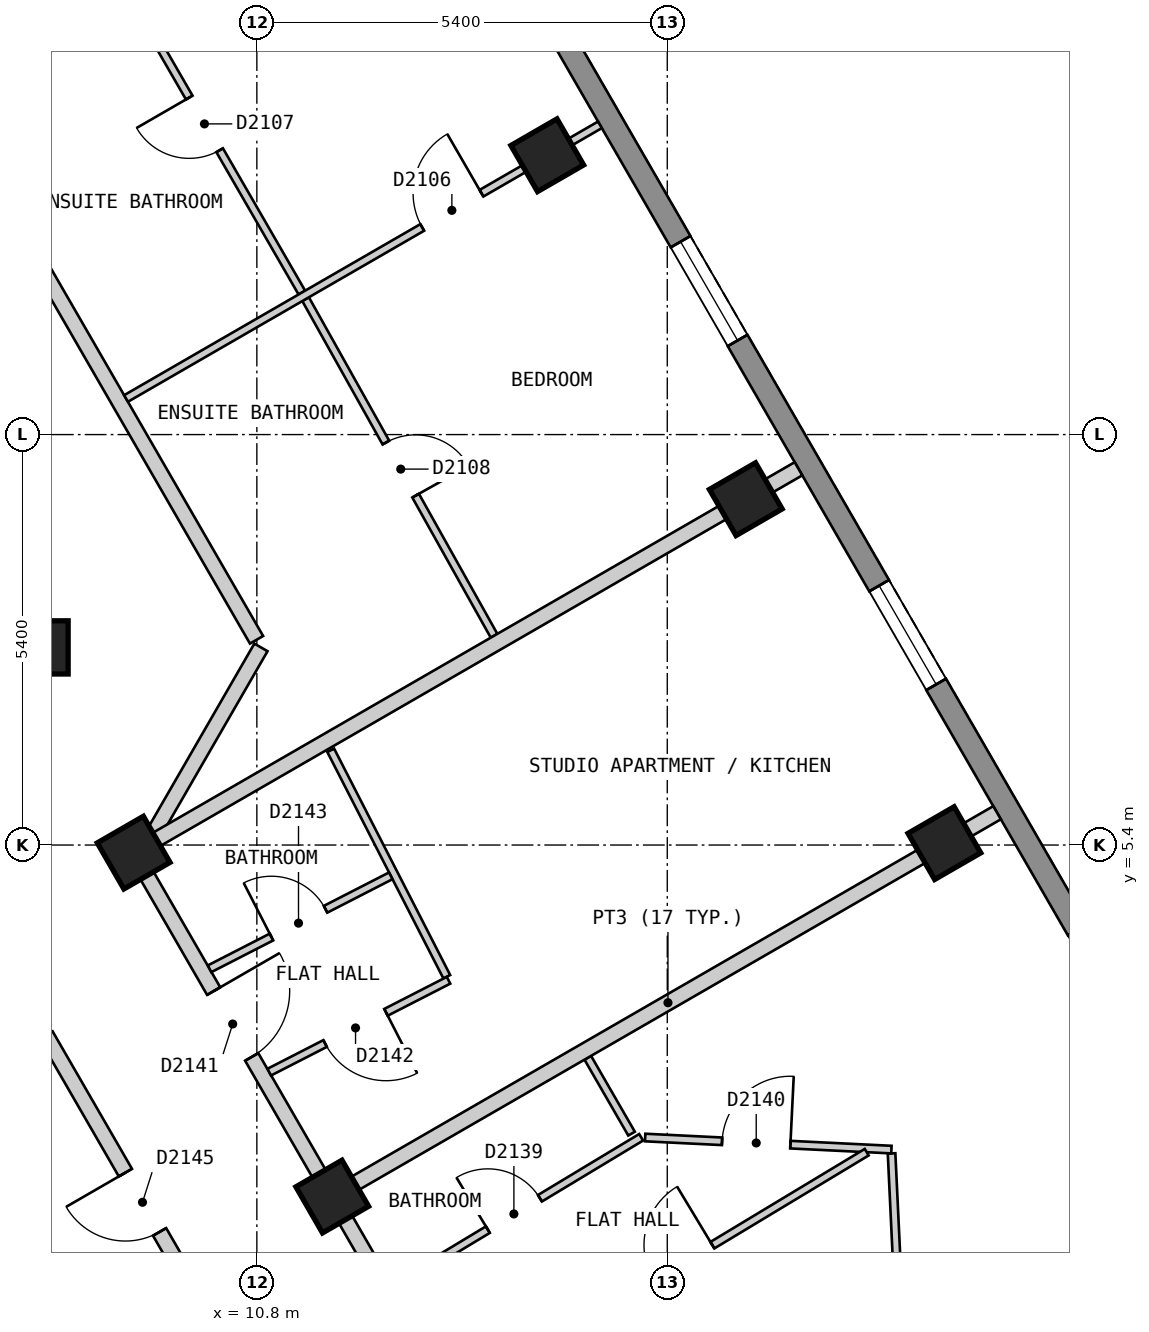
"""IFC4 building model, lengths in metres.
Left out: names, types, materials, properties, quantities, classifications, styles, units other than length and angle.
Written with IfcOpenShell. Run it as: python <this file> out.ifc"""

import sys

from ifc_helpers import new_model, si_unit, direction, frame, frame_2d, origin, origin_2d, place, context, subcontext, project, spatial, polyline, rectangle, outline, extrude, element, fill, save


model = new_model("IFC4")
c1 = context("Model", 3, precision=1e-05, world=origin(), true_north=direction((0.0, 1.0)))
c2 = subcontext(c1, "Body", "Model", "MODEL_VIEW")
j1 = project(units=[si_unit("LENGTHUNIT", "METRE"), si_unit("PLANEANGLEUNIT", "RADIAN")], contexts=[c1])
p1 = place(None, origin())
s1 = spatial("IfcSite", under=j1, at=p1, CompositionType="ELEMENT")
p2 = place(p1, origin())
s2 = spatial("IfcBuilding", under=s1, at=p2, CompositionType="ELEMENT")
p3 = place(p2, frame((0.0, 0.0, 217.8)))
s3 = spatial("IfcBuildingStorey", under=s2, at=p3, CompositionType="ELEMENT", Elevation=217.8)
for number, where, z_axis, x_axis in (
    (1, (19.846, 5.425, 0.0), (0.0, 0.0, 1.0), (-0.5, 0.866, 0.0)),
    (2, (17.233, 9.95, 0.0), (0.0, 0.0, 1.0), (-0.5, 0.866, 0.0)),
    (3, (14.621, 14.475, 0.0), (0.0, 0.0, 1.0), (-0.5, 0.866, 0.0)),
    (4, (11.792, 0.775, 0.0), (0.0, 0.0, 1.0), (-0.5, 0.866, 0.0)),
    (5, (9.179, 5.3, 0.0), (0.0, 0.0, 1.0), (-0.5, 0.866, 0.0)),
    (6, (7.967, 8.0, 0.0), (0.0, 0.0, 1.0), (1.0, 0.0, 0.0)),
):
    element("IfcColumn", number, at=place(p3, frame(where, z_axis=z_axis, x_axis=x_axis)), inside=s3, PredefinedType="COLUMN", context=c2, shape_type="SweptSolid", body=[
        extrude(rectangle(XDim=0.7, YDim=0.7, at=origin_2d()), origin(), (0.0, 0.0, 1.0), 3.0),
    ])
p4 = place(p3, frame((23.599, 0.825, 0.0), z_axis=(0.0, 0.0, 1.0), x_axis=(-0.500003656944, 0.866023292436, 0.0)))
e7 = element("IfcWall", 7, at=p4, inside=s3, PredefinedType="SOLIDWALL", context=c2, shape_type="SweptSolid", body=[
    extrude(outline(polyline([(0.0, -0.15), (22.17, -0.15), (22.09, 0.15), (0.08, 0.15), (0.0, -0.15)])), origin(), (0.0, 0.0, 1.0), 2.7),
])
p5 = place(p4, frame((2.497, 0.0, 0.15)))
e8 = element("IfcOpeningElement", 8, at=p5, cuts=e7, PredefinedType="OPENING", context=c2, shape_type="SweptSolid", body=[
    extrude(rectangle(XDim=1.5, YDim=2.1, at=frame_2d((0.75, 1.05))), frame((0.0, 0.16, 0.0), z_axis=(0.0, -1.0, 0.0), x_axis=(1.0, 0.0, 0.0)), (0.0, 0.0, 1.0), 0.32),
])
p6 = place(p4, frame((7.723, 0.0, 0.15)))
e9 = element("IfcOpeningElement", 9, at=p6, cuts=e7, PredefinedType="OPENING", context=c2, shape_type="SweptSolid", body=[
    extrude(rectangle(XDim=1.5, YDim=2.1, at=frame_2d((0.75, 1.05))), frame((0.0, 0.16, 0.0), z_axis=(0.0, -1.0, 0.0), x_axis=(1.0, 0.0, 0.0)), (0.0, 0.0, 1.0), 0.32),
])
p7 = place(p4, frame((12.948, 0.0, 0.15)))
e10 = element("IfcOpeningElement", 10, at=p7, cuts=e7, PredefinedType="OPENING", context=c2, shape_type="SweptSolid", body=[
    extrude(rectangle(XDim=1.5, YDim=2.1, at=frame_2d((0.75, 1.05))), frame((0.0, 0.16, 0.0), z_axis=(0.0, -1.0, 0.0), x_axis=(1.0, 0.0, 0.0)), (0.0, 0.0, 1.0), 0.32),
])
p8 = place(p4, frame((18.173, 0.0, 0.15)))
e11 = element("IfcOpeningElement", 11, at=p8, cuts=e7, PredefinedType="OPENING", context=c2, shape_type="SweptSolid", body=[
    extrude(rectangle(XDim=1.5, YDim=2.1, at=frame_2d((0.75, 1.05))), frame((0.0, 0.16, 0.0), z_axis=(0.0, -1.0, 0.0), x_axis=(1.0, 0.0, 0.0)), (0.0, 0.0, 1.0), 0.32),
])
p9 = place(p3, frame((8.026, 2.899, 0.0), z_axis=(0.0, 0.0, 1.0), x_axis=(0.499986018985, -0.866033475577, 0.0)))
e12 = element("IfcWall", 12, at=p9, inside=s3, PredefinedType="PARTITIONING", context=c2, shape_type="SweptSolid", body=[
    extrude(rectangle(XDim=5.078, YDim=0.2, at=frame_2d((2.539, 0.0))), origin(), (0.0, 0.0, 1.0), 2.7),
])
p10 = place(p9, frame((2.089, 0.0, 0.0)))
e13 = element("IfcOpeningElement", 13, at=p10, cuts=e12, PredefinedType="OPENING", context=c2, shape_type="SweptSolid", body=[
    extrude(rectangle(XDim=0.9, YDim=2.1, at=frame_2d((0.45, 1.05))), frame((0.0, 0.11, 0.0), z_axis=(0.0, -1.0, 0.0), x_axis=(1.0, 0.0, 0.0)), (0.0, 0.0, 1.0), 0.22),
])
p11 = place(p3, frame((9.238, 5.2, 0.0), z_axis=(0.0, 0.0, 1.0), x_axis=(0.500025705601, -0.86601056214, 0.0)))
e14 = element("IfcWall", 14, at=p11, inside=s3, PredefinedType="PARTITIONING", context=c2, shape_type="SweptSolid", body=[
    extrude(rectangle(XDim=7.735, YDim=0.2, at=frame_2d((3.868, 0.0))), origin(), (0.0, 0.0, 1.0), 2.7),
])
p12 = place(p11, frame((6.705, 0.0, 0.0)))
e15 = element("IfcOpeningElement", 15, at=p12, cuts=e14, PredefinedType="OPENING", context=c2, shape_type="SweptSolid", body=[
    extrude(rectangle(XDim=1.0, YDim=2.1, at=frame_2d((0.5, 1.05))), frame((0.0, 0.11, 0.0), z_axis=(0.0, -1.0, 0.0), x_axis=(1.0, 0.0, 0.0)), (0.0, 0.0, 1.0), 0.22),
])
p13 = place(p11, frame((1.988, 0.0, 0.0)))
e16 = element("IfcOpeningElement", 16, at=p13, cuts=e14, PredefinedType="OPENING", context=c2, shape_type="SweptSolid", body=[
    extrude(rectangle(XDim=1.0, YDim=2.1, at=frame_2d((0.5, 1.05))), frame((0.0, 0.11, 0.0), z_axis=(0.0, -1.0, 0.0), x_axis=(1.0, 0.0, 0.0)), (0.0, 0.0, 1.0), 0.22),
])
p14 = place(p3, frame((5.485, 17.3, 0.0), z_axis=(0.0, 0.0, 1.0), x_axis=(0.499943285704, -0.866058145322, 0.0)))
e17 = element("IfcWall", 17, at=p14, inside=s3, PredefinedType="PARTITIONING", context=c2, shape_type="SweptSolid", body=[
    extrude(rectangle(XDim=10.623, YDim=0.2, at=frame_2d((5.312, 0.0))), origin(), (0.0, 0.0, 1.0), 2.7),
])
p15 = place(p3, frame((9.454, 5.574, 0.0), z_axis=(0.0, 0.0, 1.0), x_axis=(0.499795394297, 0.86614350072, 0.0)))
e18 = element("IfcWall", 18, at=p15, inside=s3, PredefinedType="PARTITIONING", context=c2, shape_type="SweptSolid", body=[
    extrude(rectangle(XDim=2.801, YDim=0.2, at=frame_2d((1.4, 0.0))), origin(), (0.0, 0.0, 1.0), 2.7),
])
p16 = place(p3, frame((15.154, 2.601, 0.0), z_axis=(0.0, 0.0, 1.0), x_axis=(0.499808046739, -0.866136199691, 0.0)))
e19 = element("IfcWall", 19, at=p16, inside=s3, PredefinedType="PARTITIONING", context=c2, shape_type="SweptSolid", body=[
    extrude(rectangle(XDim=1.152, YDim=0.1, at=frame_2d((0.576, 0.0))), origin(), (0.0, 0.0, 1.0), 2.7),
])
p17 = place(p3, frame((8.829, 17.107, 0.0), z_axis=(0.0, 0.0, 1.0), x_axis=(0.500022055211, -0.866012669828, 0.0)))
e20 = element("IfcWall", 20, at=p17, inside=s3, PredefinedType="PARTITIONING", context=c2, shape_type="SweptSolid", body=[
    extrude(rectangle(XDim=5.126, YDim=0.1, at=frame_2d((2.563, 0.0))), origin(), (0.0, 0.0, 1.0), 2.7),
])
p18 = place(p17, frame((2.163, 0.0, 0.0)))
e21 = element("IfcOpeningElement", 21, at=p18, cuts=e20, PredefinedType="OPENING", context=c2, shape_type="SweptSolid", body=[
    extrude(rectangle(XDim=0.8, YDim=2.1, at=frame_2d((0.4, 1.05))), frame((0.0, 0.06, 0.0), z_axis=(0.0, -1.0, 0.0), x_axis=(1.0, 0.0, 0.0)), (0.0, 0.0, 1.0), 0.12),
])
p19 = place(p3, frame((11.441, 12.582, 0.0), z_axis=(0.0, 0.0, 1.0), x_axis=(0.488568218554, -0.872525699231, 0.0)))
e22 = element("IfcWall", 22, at=p19, inside=s3, PredefinedType="PARTITIONING", context=c2, shape_type="SweptSolid", body=[
    extrude(rectangle(XDim=5.076, YDim=0.1, at=frame_2d((2.538, 0.0))), origin(), (0.0, 0.0, 1.0), 2.7),
])
p20 = place(p19, frame((2.163, 0.0, 0.0)))
e23 = element("IfcOpeningElement", 23, at=p20, cuts=e22, PredefinedType="OPENING", context=c2, shape_type="SweptSolid", body=[
    extrude(rectangle(XDim=0.8, YDim=2.1, at=frame_2d((0.4, 1.05))), frame((0.0, 0.06, 0.0), z_axis=(0.0, -1.0, 0.0), x_axis=(1.0, 0.0, 0.0)), (0.0, 0.0, 1.0), 0.12),
])
p21 = place(p3, frame((11.772, 6.646, 0.0), z_axis=(0.0, 0.0, 1.0), x_axis=(0.456175983405, -0.889889584254, 0.0)))
e24 = element("IfcWall", 24, at=p21, inside=s3, PredefinedType="PARTITIONING", context=c2, shape_type="SweptSolid", body=[
    extrude(rectangle(XDim=3.348, YDim=0.1, at=frame_2d((1.674, 0.0))), origin(), (0.0, 0.0, 1.0), 2.7),
])
p22 = place(p3, frame((19.151, 1.343, 0.0), z_axis=(0.0, 0.0, 1.0), x_axis=(0.047509130714, -0.998870803707, 0.0)))
e25 = element("IfcWall", 25, at=p22, inside=s3, PredefinedType="PARTITIONING", context=c2, shape_type="SweptSolid", body=[
    extrude(rectangle(XDim=3.52, YDim=0.1, at=frame_2d((1.76, 0.0))), origin(), (0.0, 0.0, 1.0), 2.7),
])
p23 = place(p3, frame((15.909, 1.552, 0.0), z_axis=(0.0, 0.0, 1.0), x_axis=(0.998799003463, -0.048995414909, 0.0)))
e26 = element("IfcWall", 26, at=p23, inside=s3, PredefinedType="PARTITIONING", context=c2, shape_type="SweptSolid", body=[
    extrude(rectangle(XDim=3.244, YDim=0.1, at=frame_2d((1.622, 0.0))), origin(), (0.0, 0.0, 1.0), 2.7),
])
p24 = place(p23, frame((1.013, 0.0, 0.0)))
e27 = element("IfcOpeningElement", 27, at=p24, cuts=e26, PredefinedType="OPENING", context=c2, shape_type="SweptSolid", body=[
    extrude(rectangle(XDim=0.9, YDim=2.1, at=frame_2d((0.45, 1.05))), frame((0.0, 0.06, 0.0), z_axis=(0.0, -1.0, 0.0), x_axis=(1.0, 0.0, 0.0)), (0.0, 0.0, 1.0), 0.12),
])
p25 = place(p3, frame((10.178, 3.772, 0.0), z_axis=(0.0, 0.0, 1.0), x_axis=(0.889732071959, 0.456483121405, 0.0)))
e28 = element("IfcWall", 28, at=p25, inside=s3, PredefinedType="PARTITIONING", context=c2, shape_type="SweptSolid", body=[
    extrude(rectangle(XDim=2.679, YDim=0.1, at=frame_2d((1.34, 0.0))), origin(), (0.0, 0.0, 1.0), 2.7),
])
p26 = place(p25, frame((0.915, 0.0, 0.0)))
e29 = element("IfcOpeningElement", 29, at=p26, cuts=e28, PredefinedType="OPENING", context=c2, shape_type="SweptSolid", body=[
    extrude(rectangle(XDim=0.8, YDim=2.1, at=frame_2d((0.4, 1.05))), frame((0.0, 0.06, 0.0), z_axis=(0.0, -1.0, 0.0), x_axis=(1.0, 0.0, 0.0)), (0.0, 0.0, 1.0), 0.12),
])
p27 = place(p3, frame((10.963, 2.412, 0.0), z_axis=(0.0, 0.0, 1.0), x_axis=(0.889943997558, 0.456069820543, 0.0)))
e30 = element("IfcWall", 30, at=p27, inside=s3, PredefinedType="PARTITIONING", context=c2, shape_type="SweptSolid", body=[
    extrude(rectangle(XDim=2.651, YDim=0.1, at=frame_2d((1.325, 0.0))), origin(), (0.0, 0.0, 1.0), 2.7),
])
p28 = place(p27, frame((0.826, 0.0, 0.0)))
e31 = element("IfcOpeningElement", 31, at=p28, cuts=e30, PredefinedType="OPENING", context=c2, shape_type="SweptSolid", body=[
    extrude(rectangle(XDim=0.9, YDim=2.1, at=frame_2d((0.45, 1.05))), frame((0.0, 0.06, 0.0), z_axis=(0.0, -1.0, 0.0), x_axis=(1.0, 0.0, 0.0)), (0.0, 0.0, 1.0), 0.12),
])
p29 = place(p3, frame((9.079, 11.275, 0.0), z_axis=(0.0, 0.0, 1.0), x_axis=(0.866001485781, 0.500041424909, 0.0)))
e32 = element("IfcWall", 32, at=p29, inside=s3, PredefinedType="PARTITIONING", context=c2, shape_type="SweptSolid", body=[
    extrude(rectangle(XDim=7.2, YDim=0.1, at=frame_2d((3.6, 0.0))), origin(), (0.0, 0.0, 1.0), 2.7),
])
p30 = place(p29, frame((4.5, 0.0, 0.0)))
e33 = element("IfcOpeningElement", 33, at=p30, cuts=e32, PredefinedType="OPENING", context=c2, shape_type="SweptSolid", body=[
    extrude(rectangle(XDim=0.9, YDim=2.1, at=frame_2d((0.45, 1.05))), frame((0.0, 0.06, 0.0), z_axis=(0.0, -1.0, 0.0), x_axis=(1.0, 0.0, 0.0)), (0.0, 0.0, 1.0), 0.12),
])
p31 = place(p3, frame((12.593, -0.411, 0.0), z_axis=(0.0, 0.0, 1.0), x_axis=(0.856558445359, 0.516050026339, 0.0)))
e34 = element("IfcWall", 34, at=p31, inside=s3, PredefinedType="PARTITIONING", context=c2, shape_type="SweptSolid", body=[
    extrude(rectangle(XDim=3.809, YDim=0.1, at=frame_2d((1.905, 0.0))), origin(), (0.0, 0.0, 1.0), 2.7),
])
p32 = place(p31, frame((1.455, 0.0, 0.0)))
e35 = element("IfcOpeningElement", 35, at=p32, cuts=e34, PredefinedType="OPENING", context=c2, shape_type="SweptSolid", body=[
    extrude(rectangle(XDim=0.8, YDim=2.1, at=frame_2d((0.4, 1.05))), frame((0.0, 0.06, 0.0), z_axis=(0.0, -1.0, 0.0), x_axis=(1.0, 0.0, 0.0)), (0.0, 0.0, 1.0), 0.12),
])
p33 = place(p3, frame((14.081, -1.499, 0.0), z_axis=(0.0, 0.0, 1.0), x_axis=(0.85652273816, 0.516109289798, 0.0)))
e36 = element("IfcWall", 36, at=p33, inside=s3, PredefinedType="PARTITIONING", context=c2, shape_type="SweptSolid", body=[
    extrude(rectangle(XDim=5.537, YDim=0.1, at=frame_2d((2.769, 0.0))), origin(), (0.0, 0.0, 1.0), 2.7),
])
p34 = place(p33, frame((2.267, 0.0, 0.0)))
e37 = element("IfcOpeningElement", 37, at=p34, cuts=e36, PredefinedType="OPENING", context=c2, shape_type="SweptSolid", body=[
    extrude(rectangle(XDim=0.9, YDim=2.1, at=frame_2d((0.45, 1.05))), frame((0.0, 0.06, 0.0), z_axis=(0.0, -1.0, 0.0), x_axis=(1.0, 0.0, 0.0)), (0.0, 0.0, 1.0), 0.12),
])
p35 = place(p3, frame((11.879, 0.826, 0.0), z_axis=(0.0, 0.0, 1.0), x_axis=(0.866065245018, 0.499930986609, 0.0)))
e38 = element("IfcWall", 38, at=p35, inside=s3, PredefinedType="PARTITIONING", context=c2, shape_type="SweptSolid", body=[
    extrude(rectangle(XDim=10.0, YDim=0.2, at=frame_2d((5.0, 0.0))), origin(), (0.0, 0.0, 1.0), 2.7),
])
p36 = place(p3, frame((9.354, 5.401, 0.0), z_axis=(0.0, 0.0, 1.0), x_axis=(0.866018411306, 0.500012111133, 0.0)))
e39 = element("IfcWall", 39, at=p36, inside=s3, PredefinedType="PARTITIONING", context=c2, shape_type="SweptSolid", body=[
    extrude(rectangle(XDim=9.898, YDim=0.2, at=frame_2d((4.949, 0.0))), origin(), (0.0, 0.0, 1.0), 2.7),
])
p37 = place(p6, origin())
e40 = element("IfcWindow", 40, at=p37, inside=s3, PartitioningType="SINGLE_PANEL", PredefinedType="WINDOW", context=c2, shape_type="SweptSolid", body=[
    extrude(rectangle(XDim=1.5, YDim=2.1, at=frame_2d((0.75, 1.05))), frame((0.0, 0.03, 0.0), z_axis=(0.0, -1.0, 0.0), x_axis=(1.0, 0.0, 0.0)), (0.0, 0.0, 1.0), 0.06),
])
fill(e9, e40)
p38 = place(p7, origin())
e41 = element("IfcWindow", 41, at=p38, inside=s3, PartitioningType="SINGLE_PANEL", PredefinedType="WINDOW", context=c2, shape_type="SweptSolid", body=[
    extrude(rectangle(XDim=1.5, YDim=2.1, at=frame_2d((0.75, 1.05))), frame((0.0, 0.03, 0.0), z_axis=(0.0, -1.0, 0.0), x_axis=(1.0, 0.0, 0.0)), (0.0, 0.0, 1.0), 0.06),
])
fill(e10, e41)
p39 = place(p30, origin())
e42 = element("IfcDoor", 42, at=p39, inside=s3, OperationType="SINGLE_SWING_RIGHT", PredefinedType="DOOR", context=c2, shape_type="SweptSolid", body=[
    extrude(rectangle(XDim=0.9, YDim=2.1, at=frame_2d((0.45, 1.05))), frame((0.0, 0.025, 0.0), z_axis=(0.0, -1.0, 0.0), x_axis=(1.0, 0.0, 0.0)), (0.0, 0.0, 1.0), 0.05),
])
fill(e33, e42)
p40 = place(p18, origin())
e43 = element("IfcDoor", 43, at=p40, inside=s3, OperationType="SINGLE_SWING_LEFT", PredefinedType="DOOR", context=c2, shape_type="SweptSolid", body=[
    extrude(rectangle(XDim=0.8, YDim=2.1, at=frame_2d((0.4, 1.05))), frame((0.0, 0.025, 0.0), z_axis=(0.0, -1.0, 0.0), x_axis=(1.0, 0.0, 0.0)), (0.0, 0.0, 1.0), 0.05),
])
fill(e21, e43)
p41 = place(p20, origin())
e44 = element("IfcDoor", 44, at=p41, inside=s3, OperationType="SINGLE_SWING_RIGHT", PredefinedType="DOOR", context=c2, shape_type="SweptSolid", body=[
    extrude(rectangle(XDim=0.8, YDim=2.1, at=frame_2d((0.4, 1.05))), frame((0.0, 0.025, 0.0), z_axis=(0.0, -1.0, 0.0), x_axis=(1.0, 0.0, 0.0)), (0.0, 0.0, 1.0), 0.05),
])
fill(e23, e44)
p42 = place(p34, origin())
e45 = element("IfcDoor", 45, at=p42, inside=s3, OperationType="SINGLE_SWING_RIGHT", PredefinedType="DOOR", context=c2, shape_type="SweptSolid", body=[
    extrude(rectangle(XDim=0.9, YDim=2.1, at=frame_2d((0.45, 1.05))), frame((0.0, 0.025, 0.0), z_axis=(0.0, -1.0, 0.0), x_axis=(1.0, 0.0, 0.0)), (0.0, 0.0, 1.0), 0.05),
])
fill(e37, e45)
p43 = place(p32, origin())
e46 = element("IfcDoor", 46, at=p43, inside=s3, OperationType="SINGLE_SWING_LEFT", PredefinedType="DOOR", context=c2, shape_type="SweptSolid", body=[
    extrude(rectangle(XDim=0.8, YDim=2.1, at=frame_2d((0.4, 1.05))), frame((0.0, 0.025, 0.0), z_axis=(0.0, -1.0, 0.0), x_axis=(1.0, 0.0, 0.0)), (0.0, 0.0, 1.0), 0.05),
])
fill(e35, e46)
p44 = place(p24, origin())
e47 = element("IfcDoor", 47, at=p44, inside=s3, OperationType="SINGLE_SWING_RIGHT", PredefinedType="DOOR", context=c2, shape_type="SweptSolid", body=[
    extrude(rectangle(XDim=0.9, YDim=2.1, at=frame_2d((0.45, 1.05))), frame((0.0, 0.025, 0.0), z_axis=(0.0, -1.0, 0.0), x_axis=(1.0, 0.0, 0.0)), (0.0, 0.0, 1.0), 0.05),
])
fill(e27, e47)
p45 = place(p13, origin())
e48 = element("IfcDoor", 48, at=p45, inside=s3, OperationType="SINGLE_SWING_LEFT", PredefinedType="DOOR", context=c2, shape_type="SweptSolid", body=[
    extrude(rectangle(XDim=1.0, YDim=2.1, at=frame_2d((0.5, 1.05))), frame((0.0, 0.025, 0.0), z_axis=(0.0, -1.0, 0.0), x_axis=(1.0, 0.0, 0.0)), (0.0, 0.0, 1.0), 0.05),
])
fill(e16, e48)
p46 = place(p28, origin())
e49 = element("IfcDoor", 49, at=p46, inside=s3, OperationType="SINGLE_SWING_RIGHT", PredefinedType="DOOR", context=c2, shape_type="SweptSolid", body=[
    extrude(rectangle(XDim=0.9, YDim=2.1, at=frame_2d((0.45, 1.05))), frame((0.0, 0.025, 0.0), z_axis=(0.0, -1.0, 0.0), x_axis=(1.0, 0.0, 0.0)), (0.0, 0.0, 1.0), 0.05),
])
fill(e31, e49)
p47 = place(p26, origin())
e50 = element("IfcDoor", 50, at=p47, inside=s3, OperationType="SINGLE_SWING_LEFT", PredefinedType="DOOR", context=c2, shape_type="SweptSolid", body=[
    extrude(rectangle(XDim=0.8, YDim=2.1, at=frame_2d((0.4, 1.05))), frame((0.0, 0.025, 0.0), z_axis=(0.0, -1.0, 0.0), x_axis=(1.0, 0.0, 0.0)), (0.0, 0.0, 1.0), 0.05),
])
fill(e29, e50)
p48 = place(p10, origin())
e51 = element("IfcDoor", 51, at=p48, inside=s3, OperationType="SINGLE_SWING_LEFT", PredefinedType="DOOR", context=c2, shape_type="SweptSolid", body=[
    extrude(rectangle(XDim=0.9, YDim=2.1, at=frame_2d((0.45, 1.05))), frame((0.0, 0.025, 0.0), z_axis=(0.0, -1.0, 0.0), x_axis=(1.0, 0.0, 0.0)), (0.0, 0.0, 1.0), 0.05),
])
fill(e13, e51)
save(model, sys.argv[1])
